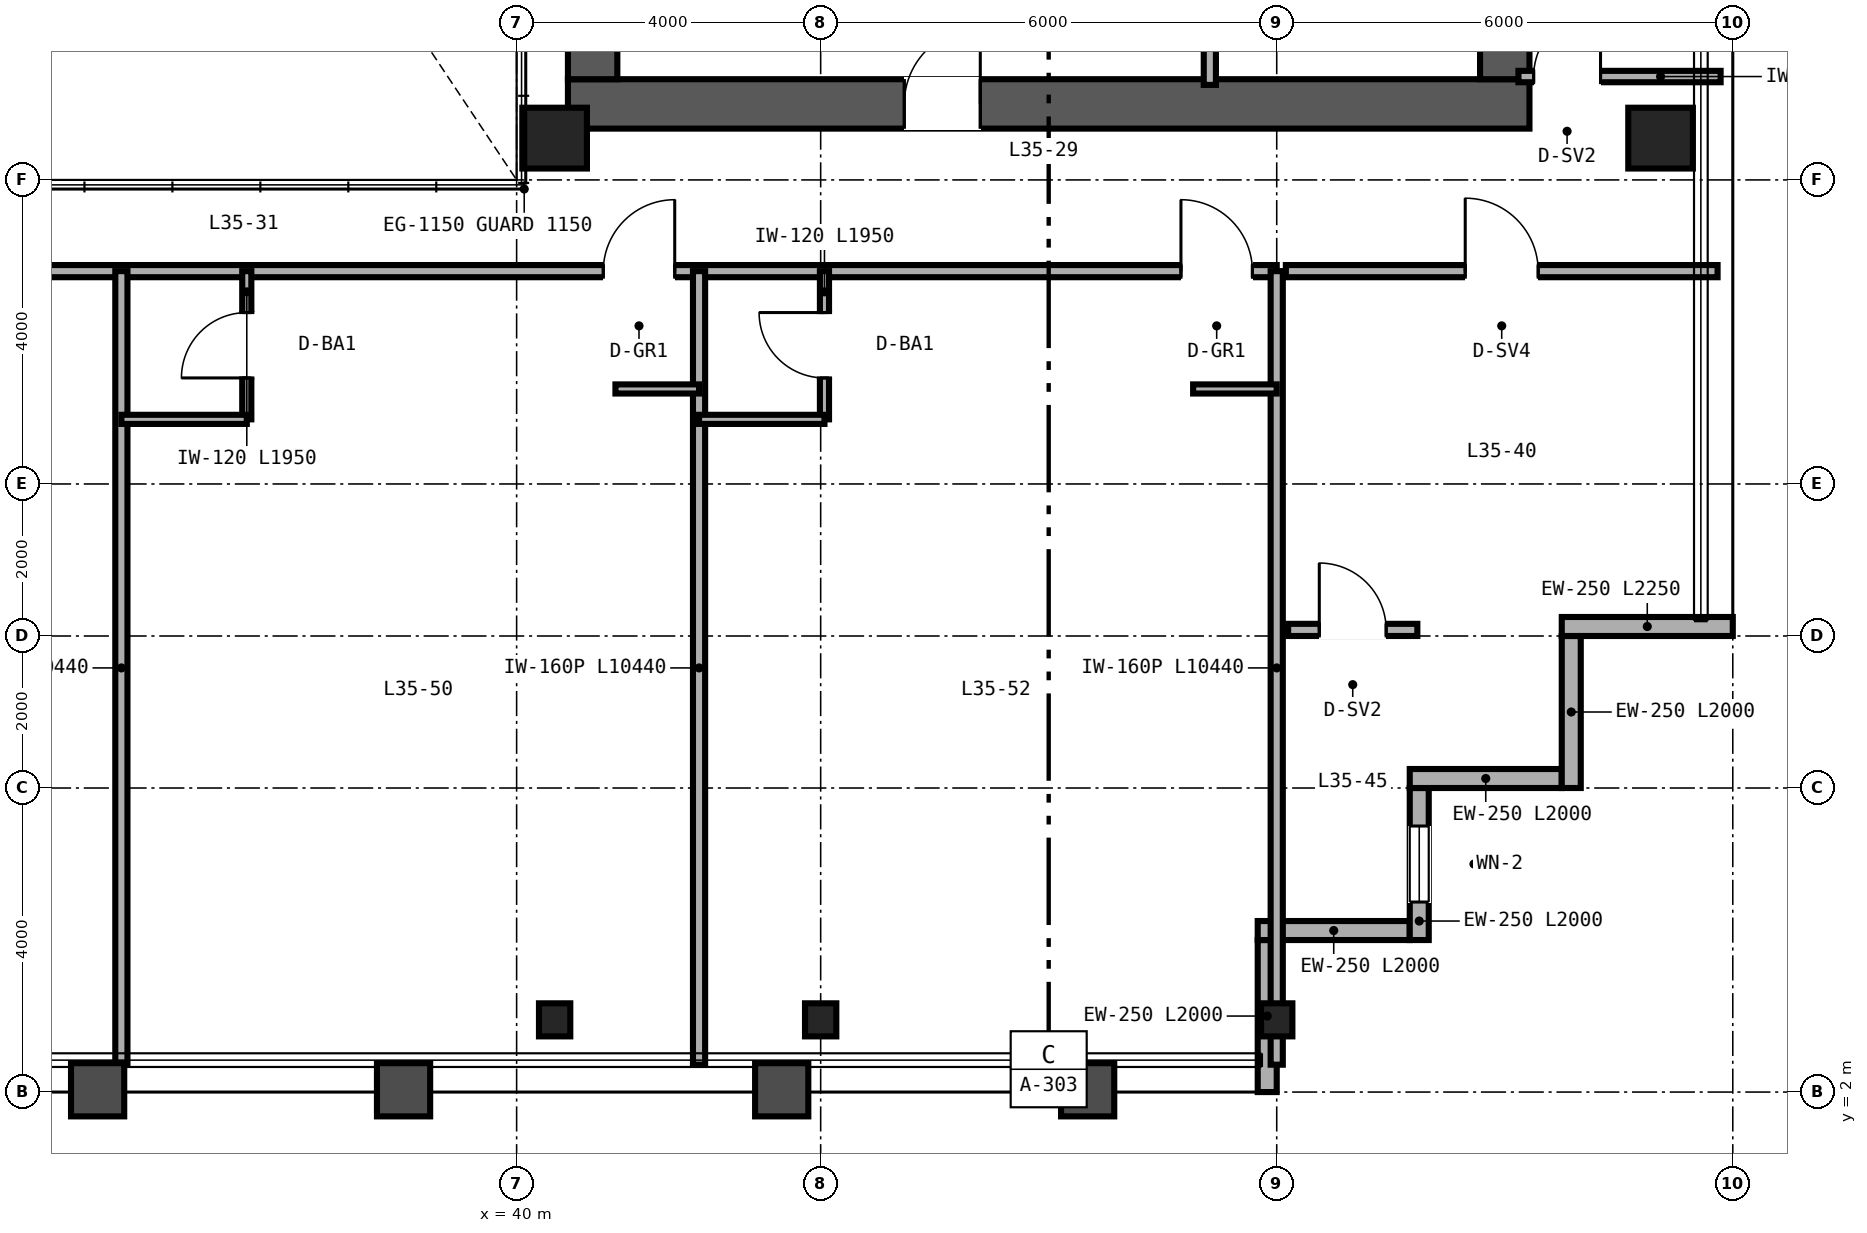
"""IFC4 building model, lengths in metres.
Left out: names, types, materials, properties, quantities, classifications, styles, units other than length and angle.
Written with IfcOpenShell. Run it as: python <this file> out.ifc"""

import sys

from ifc_helpers import new_model, si_unit, direction, frame, frame_2d, origin, origin_2d, place, context, subcontext, project, spatial, rectangle, hollow_rectangle, i_section, extrude, source, transform, mapped, element, fill, save


model = new_model("IFC4")
c1 = context("Model", 3, precision=1e-05, world=origin(), true_north=direction((0.0, 1.0)))
c2 = subcontext(c1, "Body", "Model", "MODEL_VIEW")
j1 = project(units=[si_unit("LENGTHUNIT", "METRE"), si_unit("PLANEANGLEUNIT", "RADIAN")], contexts=[c1])
p1 = place(None, origin())
s1 = spatial("IfcSite", under=j1, at=p1, CompositionType="ELEMENT")
p2 = place(p1, origin())
s2 = spatial("IfcBuilding", under=s1, at=p2, CompositionType="ELEMENT")
p3 = place(p2, frame((0.0, 0.0, 140.4)))
s3 = spatial("IfcBuildingStorey", under=s2, at=p3, CompositionType="ELEMENT", Elevation=140.4)
p4 = place(p3, frame((40.675, 15.0, 0.0), z_axis=(0.0, 0.0, 1.0), x_axis=(1.0, 0.0, 0.0)))
e1 = element("IfcWall", 1, at=p4, inside=s3, PredefinedType="SHEAR", context=c2, shape_type="SweptSolid", body=[
    extrude(rectangle(XDim=12.65, YDim=0.65, at=frame_2d((6.325, 0.0))), origin(), (0.0, 0.0, 1.0), 3.36),
])
p5 = place(p4, frame((4.425, 0.0, 0.0)))
e2 = element("IfcOpeningElement", 2, at=p5, cuts=e1, PredefinedType="OPENING", context=c2, shape_type="SweptSolid", body=[
    extrude(rectangle(XDim=1.0, YDim=2.15, at=frame_2d((0.5, 1.075))), frame((0.0, 0.335, 0.0), z_axis=(0.0, -1.0, 0.0), x_axis=(1.0, 0.0, 0.0)), (0.0, 0.0, 1.0), 0.67),
])
for number, where, z_axis, x_axis in (
    (3, (41.0, 15.325, 0.0), (0.0, 0.0, 1.0), (0.0, 1.0, 0.0)),
    (4, (53.0, 15.325, 0.0), (0.0, 0.0, 1.0), (0.0, 1.0, 0.0)),
):
    element("IfcWall", number, at=place(p3, frame(where, z_axis=z_axis, x_axis=x_axis)), inside=s3, PredefinedType="SHEAR", context=c2, shape_type="SweptSolid", body=[
        extrude(rectangle(XDim=21.35, YDim=0.65, at=frame_2d((10.675, 0.0))), origin(), (0.0, 0.0, 1.0), 3.36),
    ])
m1 = source(origin(), c2, "Body", "SweptSolid", [
    extrude(hollow_rectangle(XDim=0.85, YDim=0.8, WallThickness=0.032, at=origin_2d()), origin(), (0.0, 0.0, 1.0), 3.36),
])
for number, where, z_axis, x_axis in (
    (5, (40.5, 14.55, 0.0), (0.0, 0.0, 1.0), (1.0, 0.0, 0.0)),
    (6, (55.05, 14.55, 0.0), (0.0, 0.0, 1.0), (1.0, 0.0, 0.0)),
):
    element("IfcColumn", number, at=place(p3, frame(where, z_axis=z_axis, x_axis=x_axis)), inside=s3, PredefinedType="COLUMN", context=c2, shape_type="MappedRepresentation", body=[
        mapped(m1, transform((0.0, 0.0, 0.0), scale=1.0)),
    ])
m2 = source(origin(), c2, "Body", "SweptSolid", [
    extrude(i_section(OverallWidth=0.412, OverallDepth=0.435, WebThickness=0.036, FlangeThickness=0.057, FilletRadius=0.025, at=origin_2d()), origin(), (0.0, 0.0, 1.0), 3.36),
])
for number, where, z_axis, x_axis in (
    (7, (40.5, 2.95, 0.0), (0.0, 0.0, 1.0), (1.0, 0.0, 0.0)),
    (8, (44.0, 2.95, 0.0), (0.0, 0.0, 1.0), (1.0, 0.0, 0.0)),
    (9, (50.0, 2.95, 0.0), (0.0, 0.0, 1.0), (1.0, 0.0, 0.0)),
):
    element("IfcColumn", number, at=place(p3, frame(where, z_axis=z_axis, x_axis=x_axis)), inside=s3, PredefinedType="COLUMN", context=c2, shape_type="MappedRepresentation", body=[
        mapped(m2, transform((0.0, 0.0, 0.0), scale=1.0)),
    ])
p6 = place(p3, frame((49.875, 2.0, 0.0), z_axis=(0.0, 0.0, 1.0), x_axis=(0.0, 1.0, 0.0)))
e10 = element("IfcWall", 10, at=p6, inside=s3, PredefinedType="SOLIDWALL", context=c2, shape_type="SweptSolid", body=[
    extrude(rectangle(XDim=2.0, YDim=0.25, at=frame_2d((1.0, 0.0))), origin(), (0.0, 0.0, 1.0), 2.667),
])
p7 = place(p3, frame((49.75, 4.125, 0.0), z_axis=(0.0, 0.0, 1.0), x_axis=(1.0, 0.0, 0.0)))
e11 = element("IfcWall", 11, at=p7, inside=s3, PredefinedType="SOLIDWALL", context=c2, shape_type="SweptSolid", body=[
    extrude(rectangle(XDim=2.0, YDim=0.25, at=frame_2d((1.0, 0.0))), origin(), (0.0, 0.0, 1.0), 3.36),
])
p8 = place(p3, frame((51.875, 4.0, 0.0), z_axis=(0.0, 0.0, 1.0), x_axis=(0.0, 1.0, 0.0)))
e12 = element("IfcWall", 12, at=p8, inside=s3, PredefinedType="SOLIDWALL", context=c2, shape_type="SweptSolid", body=[
    extrude(rectangle(XDim=2.0, YDim=0.25, at=frame_2d((1.0, 0.0))), origin(), (0.0, 0.0, 1.0), 3.36),
])
p9 = place(p8, frame((0.5, 0.0, 0.85)))
e13 = element("IfcOpeningElement", 13, at=p9, cuts=e12, PredefinedType="OPENING", context=c2, shape_type="SweptSolid", body=[
    extrude(rectangle(XDim=1.0, YDim=1.9, at=frame_2d((0.5, 0.95))), frame((0.0, 0.135, 0.0), z_axis=(0.0, -1.0, 0.0), x_axis=(1.0, 0.0, 0.0)), (0.0, 0.0, 1.0), 0.27),
])
for number, where, z_axis, x_axis in (
    (14, (51.75, 6.125, 0.0), (0.0, 0.0, 1.0), (1.0, 0.0, 0.0)),
    (15, (53.875, 6.0, 0.0), (0.0, 0.0, 1.0), (0.0, 1.0, 0.0)),
):
    element("IfcWall", number, at=place(p3, frame(where, z_axis=z_axis, x_axis=x_axis)), inside=s3, PredefinedType="SOLIDWALL", context=c2, shape_type="SweptSolid", body=[
        extrude(rectangle(XDim=2.0, YDim=0.25, at=frame_2d((1.0, 0.0))), origin(), (0.0, 0.0, 1.0), 3.36),
    ])
p10 = place(p3, frame((53.75, 8.125, 0.0), z_axis=(0.0, 0.0, 1.0), x_axis=(1.0, 0.0, 0.0)))
e16 = element("IfcWall", 16, at=p10, inside=s3, PredefinedType="SOLIDWALL", context=c2, shape_type="SweptSolid", body=[
    extrude(rectangle(XDim=2.25, YDim=0.25, at=frame_2d((1.125, 0.0))), origin(), (0.0, 0.0, 1.0), 3.36),
])
p11 = place(p3, frame((49.12, 15.25, 0.0), z_axis=(0.0, 0.0, 1.0), x_axis=(0.0, 1.0, 0.0)))
e17 = element("IfcWall", 17, at=p11, inside=s3, PredefinedType="PARTITIONING", context=c2, shape_type="SweptSolid", body=[
    extrude(rectangle(XDim=16.13, YDim=0.16, at=frame_2d((8.065, 0.0))), origin(), (0.0, 0.0, 1.0), 2.36),
])
p12 = place(p11, frame((2.2, 0.0, 0.0)))
e18 = element("IfcOpeningElement", 18, at=p12, cuts=e17, PredefinedType="OPENING", context=c2, shape_type="SweptSolid", body=[
    extrude(rectangle(XDim=0.9, YDim=2.15, at=frame_2d((0.45, 1.075))), frame((0.0, 0.09, 0.0), z_axis=(0.0, -1.0, 0.0), x_axis=(1.0, 0.0, 0.0)), (0.0, 0.0, 1.0), 0.18),
])
p13 = place(p11, frame((8.2, 0.0, 0.0)))
e19 = element("IfcOpeningElement", 19, at=p13, cuts=e17, PredefinedType="OPENING", context=c2, shape_type="SweptSolid", body=[
    extrude(rectangle(XDim=0.9, YDim=2.15, at=frame_2d((0.45, 1.075))), frame((0.0, 0.09, 0.0), z_axis=(0.0, -1.0, 0.0), x_axis=(1.0, 0.0, 0.0)), (0.0, 0.0, 1.0), 0.18),
])
p14 = place(p11, frame((13.5, 0.0, 0.0)))
e20 = element("IfcOpeningElement", 20, at=p14, cuts=e17, PredefinedType="OPENING", context=c2, shape_type="SweptSolid", body=[
    extrude(rectangle(XDim=0.9, YDim=2.15, at=frame_2d((0.45, 1.075))), frame((0.0, 0.09, 0.0), z_axis=(0.0, -1.0, 0.0), x_axis=(1.0, 0.0, 0.0)), (0.0, 0.0, 1.0), 0.18),
])
p15 = place(p3, frame((53.18, 15.36, 0.0), z_axis=(0.0, 0.0, 1.0), x_axis=(1.0, 0.0, 0.0)))
e21 = element("IfcWall", 21, at=p15, inside=s3, PredefinedType="PARTITIONING", context=c2, shape_type="SweptSolid", body=[
    extrude(rectangle(XDim=2.66, YDim=0.15, at=frame_2d((1.33, 0.0))), origin(), (0.0, 0.0, 1.0), 2.581),
])
p16 = place(p15, frame((0.2, 0.0, 0.0)))
e22 = element("IfcOpeningElement", 22, at=p16, cuts=e21, PredefinedType="OPENING", context=c2, shape_type="SweptSolid", body=[
    extrude(rectangle(XDim=0.88, YDim=2.15, at=frame_2d((0.44, 1.075))), frame((0.0, 0.085, 0.0), z_axis=(0.0, -1.0, 0.0), x_axis=(1.0, 0.0, 0.0)), (0.0, 0.0, 1.0), 0.17),
])
p17 = place(p3, frame((50.12, 12.8, 0.0), z_axis=(0.0, 0.0, 1.0), x_axis=(1.0, 0.0, 0.0)))
e23 = element("IfcWall", 23, at=p17, inside=s3, PredefinedType="PARTITIONING", context=c2, shape_type="SweptSolid", body=[
    extrude(rectangle(XDim=5.68, YDim=0.16, at=frame_2d((2.84, 0.0))), origin(), (0.0, 0.0, 1.0), 3.36),
])
p18 = place(p17, frame((2.36, 0.0, 0.0)))
e24 = element("IfcOpeningElement", 24, at=p18, cuts=e23, PredefinedType="OPENING", context=c2, shape_type="SweptSolid", body=[
    extrude(rectangle(XDim=0.96, YDim=2.15, at=frame_2d((0.48, 1.075))), frame((0.0, 0.09, 0.0), z_axis=(0.0, -1.0, 0.0), x_axis=(1.0, 0.0, 0.0)), (0.0, 0.0, 1.0), 0.18),
])
p19 = place(p3, frame((50.15, 8.08, 0.0), z_axis=(0.0, 0.0, 1.0), x_axis=(1.0, 0.0, 0.0)))
e25 = element("IfcWall", 25, at=p19, inside=s3, PredefinedType="PARTITIONING", context=c2, shape_type="SweptSolid", body=[
    extrude(rectangle(XDim=1.7, YDim=0.16, at=frame_2d((0.85, 0.0))), origin(), (0.0, 0.0, 1.0), 3.36),
])
p20 = place(p19, frame((0.41, 0.0, 0.0)))
e26 = element("IfcOpeningElement", 26, at=p20, cuts=e25, PredefinedType="OPENING", context=c2, shape_type="SweptSolid", body=[
    extrude(rectangle(XDim=0.88, YDim=2.15, at=frame_2d((0.44, 1.075))), frame((0.0, 0.09, 0.0), z_axis=(0.0, -1.0, 0.0), x_axis=(1.0, 0.0, 0.0)), (0.0, 0.0, 1.0), 0.18),
])
p21 = place(p3, frame((14.0, 12.8, 0.0), z_axis=(0.0, 0.0, 1.0), x_axis=(1.0, 0.0, 0.0)))
e27 = element("IfcWall", 27, at=p21, inside=s3, PredefinedType="PARTITIONING", context=c2, shape_type="SweptSolid", body=[
    extrude(rectangle(XDim=36.0, YDim=0.16, at=frame_2d((18.0, 0.0))), origin(), (0.0, 0.0, 1.0), 2.581),
])
p22 = place(p21, frame((5.5, 0.0, 0.0)))
e28 = element("IfcOpeningElement", 28, at=p22, cuts=e27, PredefinedType="OPENING", context=c2, shape_type="SweptSolid", body=[
    extrude(rectangle(XDim=0.98, YDim=2.2, at=frame_2d((0.49, 1.1))), frame((0.0, 0.09, 0.0), z_axis=(0.0, -1.0, 0.0), x_axis=(1.0, 0.0, 0.0)), (0.0, 0.0, 1.0), 0.18),
])
p23 = place(p21, frame((10.2, 0.0, 0.0)))
e29 = element("IfcOpeningElement", 29, at=p23, cuts=e27, PredefinedType="OPENING", context=c2, shape_type="SweptSolid", body=[
    extrude(rectangle(XDim=0.96, YDim=2.15, at=frame_2d((0.48, 1.075))), frame((0.0, 0.09, 0.0), z_axis=(0.0, -1.0, 0.0), x_axis=(1.0, 0.0, 0.0)), (0.0, 0.0, 1.0), 0.18),
])
p24 = place(p21, frame((16.72, 0.0, 0.0)))
e30 = element("IfcOpeningElement", 30, at=p24, cuts=e27, PredefinedType="OPENING", context=c2, shape_type="SweptSolid", body=[
    extrude(rectangle(XDim=0.96, YDim=2.15, at=frame_2d((0.48, 1.075))), frame((0.0, 0.09, 0.0), z_axis=(0.0, -1.0, 0.0), x_axis=(1.0, 0.0, 0.0)), (0.0, 0.0, 1.0), 0.18),
])
p25 = place(p21, frame((27.14, 0.0, 0.0)))
e31 = element("IfcOpeningElement", 31, at=p25, cuts=e27, PredefinedType="OPENING", context=c2, shape_type="SweptSolid", body=[
    extrude(rectangle(XDim=0.94, YDim=2.15, at=frame_2d((0.47, 1.075))), frame((0.0, 0.09, 0.0), z_axis=(0.0, -1.0, 0.0), x_axis=(1.0, 0.0, 0.0)), (0.0, 0.0, 1.0), 0.18),
])
p26 = place(p21, frame((34.74, 0.0, 0.0)))
e32 = element("IfcOpeningElement", 32, at=p26, cuts=e27, PredefinedType="OPENING", context=c2, shape_type="SweptSolid", body=[
    extrude(rectangle(XDim=0.94, YDim=2.15, at=frame_2d((0.47, 1.075))), frame((0.0, 0.09, 0.0), z_axis=(0.0, -1.0, 0.0), x_axis=(1.0, 0.0, 0.0)), (0.0, 0.0, 1.0), 0.18),
])
p27 = place(p3, frame((50.0, 2.36, 0.0), z_axis=(0.0, 0.0, 1.0), x_axis=(0.0, 1.0, 0.0)))
e33 = element("IfcWall", 33, at=p27, inside=s3, PredefinedType="PARTITIONING", context=c2, shape_type="SweptSolid", body=[
    extrude(rectangle(XDim=10.44, YDim=0.16, at=frame_2d((5.22, 0.0))), origin(), (0.0, 0.0, 1.0), 2.667),
])
p28 = place(p3, frame((34.8, 2.36, 0.0), z_axis=(0.0, 0.0, 1.0), x_axis=(0.0, 1.0, 0.0)))
e34 = element("IfcWall", 34, at=p28, inside=s3, PredefinedType="PARTITIONING", context=c2, shape_type="SweptSolid", body=[
    extrude(rectangle(XDim=10.44, YDim=0.16, at=frame_2d((5.22, 0.0))), origin(), (0.0, 0.0, 1.0), 2.433),
])
p29 = place(p3, frame((42.4, 2.36, 0.0), z_axis=(0.0, 0.0, 1.0), x_axis=(0.0, 1.0, 0.0)))
e35 = element("IfcWall", 35, at=p29, inside=s3, PredefinedType="PARTITIONING", context=c2, shape_type="SweptSolid", body=[
    extrude(rectangle(XDim=10.44, YDim=0.16, at=frame_2d((5.22, 0.0))), origin(), (0.0, 0.0, 1.0), 2.823),
])
p30 = place(p3, frame((36.45, 10.85, 0.0), z_axis=(0.0, 0.0, 1.0), x_axis=(0.0, 1.0, 0.0)))
e36 = element("IfcWall", 36, at=p30, inside=s3, PredefinedType="PARTITIONING", context=c2, shape_type="SweptSolid", body=[
    extrude(rectangle(XDim=1.95, YDim=0.12, at=frame_2d((0.975, 0.0))), origin(), (0.0, 0.0, 1.0), 3.36),
])
p31 = place(p30, frame((0.545, 0.0, 0.0)))
e37 = element("IfcOpeningElement", 37, at=p31, cuts=e36, PredefinedType="OPENING", context=c2, shape_type="SweptSolid", body=[
    extrude(rectangle(XDim=0.86, YDim=2.1, at=frame_2d((0.43, 1.05))), frame((0.0, 0.07, 0.0), z_axis=(0.0, -1.0, 0.0), x_axis=(1.0, 0.0, 0.0)), (0.0, 0.0, 1.0), 0.14),
])
p32 = place(p3, frame((34.8, 10.85, 0.0), z_axis=(0.0, 0.0, 1.0), x_axis=(1.0, 0.0, 0.0)))
e38 = element("IfcWall", 38, at=p32, inside=s3, PredefinedType="PARTITIONING", context=c2, shape_type="SweptSolid", body=[
    extrude(rectangle(XDim=1.65, YDim=0.12, at=frame_2d((0.825, 0.0))), origin(), (0.0, 0.0, 1.0), 3.36),
])
p33 = place(p3, frame((41.3, 11.25, 0.0), z_axis=(0.0, 0.0, 1.0), x_axis=(1.0, 0.0, 0.0)))
e39 = element("IfcWall", 39, at=p33, inside=s3, PredefinedType="PARTITIONING", context=c2, shape_type="SweptSolid", body=[
    extrude(rectangle(XDim=1.1, YDim=0.12, at=frame_2d((0.55, 0.0))), origin(), (0.0, 0.0, 1.0), 3.36),
])
p34 = place(p3, frame((44.05, 10.85, 0.0), z_axis=(0.0, 0.0, 1.0), x_axis=(0.0, 1.0, 0.0)))
e40 = element("IfcWall", 40, at=p34, inside=s3, PredefinedType="PARTITIONING", context=c2, shape_type="SweptSolid", body=[
    extrude(rectangle(XDim=1.95, YDim=0.12, at=frame_2d((0.975, 0.0))), origin(), (0.0, 0.0, 1.0), 3.36),
])
p35 = place(p34, frame((0.545, 0.0, 0.0)))
e41 = element("IfcOpeningElement", 41, at=p35, cuts=e40, PredefinedType="OPENING", context=c2, shape_type="SweptSolid", body=[
    extrude(rectangle(XDim=0.86, YDim=2.1, at=frame_2d((0.43, 1.05))), frame((0.0, 0.07, 0.0), z_axis=(0.0, -1.0, 0.0), x_axis=(1.0, 0.0, 0.0)), (0.0, 0.0, 1.0), 0.14),
])
p36 = place(p3, frame((42.4, 10.85, 0.0), z_axis=(0.0, 0.0, 1.0), x_axis=(1.0, 0.0, 0.0)))
e42 = element("IfcWall", 42, at=p36, inside=s3, PredefinedType="PARTITIONING", context=c2, shape_type="SweptSolid", body=[
    extrude(rectangle(XDim=1.65, YDim=0.12, at=frame_2d((0.825, 0.0))), origin(), (0.0, 0.0, 1.0), 3.36),
])
p37 = place(p3, frame((48.9, 11.25, 0.0), z_axis=(0.0, 0.0, 1.0), x_axis=(1.0, 0.0, 0.0)))
e43 = element("IfcWall", 43, at=p37, inside=s3, PredefinedType="PARTITIONING", context=c2, shape_type="SweptSolid", body=[
    extrude(rectangle(XDim=1.1, YDim=0.12, at=frame_2d((0.55, 0.0))), origin(), (0.0, 0.0, 1.0), 3.36),
])
m3 = source(origin(), c2, "Body", "SweptSolid", [
    extrude(rectangle(XDim=1.0, YDim=1.9, at=frame_2d((0.5, 0.95))), frame((0.0, 0.03, 0.0), z_axis=(0.0, -1.0, 0.0), x_axis=(1.0, 0.0, 0.0)), (0.0, 0.0, 1.0), 0.06),
])
p38 = place(p9, origin())
e44 = element("IfcWindow", 44, at=p38, inside=s3, PartitioningType="SINGLE_PANEL", PredefinedType="WINDOW", context=c2, shape_type="MappedRepresentation", body=[
    mapped(m3, transform((0.0, 0.0, 0.0), scale=1.0)),
])
fill(e13, e44)
m4 = source(origin(), c2, "Body", "SweptSolid", [
    extrude(rectangle(XDim=1.0, YDim=2.15, at=frame_2d((0.5, 1.075))), frame((0.0, 0.025, 0.0), z_axis=(0.0, -1.0, 0.0), x_axis=(1.0, 0.0, 0.0)), (0.0, 0.0, 1.0), 0.05),
])
p39 = place(p5, origin())
e45 = element("IfcDoor", 45, at=p39, inside=s3, OperationType="SINGLE_SWING_RIGHT", PredefinedType="DOOR", context=c2, shape_type="MappedRepresentation", body=[
    mapped(m4, transform((0.0, 0.0, 0.0), scale=1.0)),
])
fill(e2, e45)
m5 = source(origin(), c2, "Body", "SweptSolid", [
    extrude(rectangle(XDim=0.88, YDim=2.15, at=frame_2d((0.44, 1.075))), frame((0.0, 0.025, 0.0), z_axis=(0.0, -1.0, 0.0), x_axis=(1.0, 0.0, 0.0)), (0.0, 0.0, 1.0), 0.05),
])
p40 = place(p16, origin())
e46 = element("IfcDoor", 46, at=p40, inside=s3, OperationType="SINGLE_SWING_RIGHT", PredefinedType="DOOR", context=c2, shape_type="MappedRepresentation", body=[
    mapped(m5, transform((0.0, 0.0, 0.0), scale=1.0)),
])
fill(e22, e46)
m6 = source(origin(), c2, "Body", "SweptSolid", [
    extrude(rectangle(XDim=0.96, YDim=2.15, at=frame_2d((0.48, 1.075))), frame((0.0, 0.025, 0.0), z_axis=(0.0, -1.0, 0.0), x_axis=(1.0, 0.0, 0.0)), (0.0, 0.0, 1.0), 0.05),
])
p41 = place(p18, origin())
e47 = element("IfcDoor", 47, at=p41, inside=s3, OperationType="SINGLE_SWING_LEFT", PredefinedType="DOOR", context=c2, shape_type="MappedRepresentation", body=[
    mapped(m6, transform((0.0, 0.0, 0.0), scale=1.0)),
])
fill(e24, e47)
p42 = place(p20, origin())
e48 = element("IfcDoor", 48, at=p42, inside=s3, OperationType="SINGLE_SWING_LEFT", PredefinedType="DOOR", context=c2, shape_type="MappedRepresentation", body=[
    mapped(m5, transform((0.0, 0.0, 0.0), scale=1.0)),
])
fill(e26, e48)
m7 = source(origin(), c2, "Body", "SweptSolid", [
    extrude(rectangle(XDim=0.86, YDim=2.1, at=frame_2d((0.43, 1.05))), frame((0.0, 0.025, 0.0), z_axis=(0.0, -1.0, 0.0), x_axis=(1.0, 0.0, 0.0)), (0.0, 0.0, 1.0), 0.05),
])
p43 = place(p31, origin())
e49 = element("IfcDoor", 49, at=p43, inside=s3, OperationType="SINGLE_SWING_LEFT", PredefinedType="DOOR", context=c2, shape_type="MappedRepresentation", body=[
    mapped(m7, transform((0.0, 0.0, 0.0), scale=1.0)),
])
fill(e37, e49)
p44 = place(p35, origin())
e50 = element("IfcDoor", 50, at=p44, inside=s3, OperationType="SINGLE_SWING_RIGHT", PredefinedType="DOOR", context=c2, shape_type="MappedRepresentation", body=[
    mapped(m7, transform((0.0, 0.0, 0.0), scale=1.0)),
])
fill(e41, e50)
m8 = source(origin(), c2, "Body", "SweptSolid", [
    extrude(rectangle(XDim=0.94, YDim=2.15, at=frame_2d((0.47, 1.075))), frame((0.0, 0.025, 0.0), z_axis=(0.0, -1.0, 0.0), x_axis=(1.0, 0.0, 0.0)), (0.0, 0.0, 1.0), 0.05),
])
p45 = place(p25, origin())
e51 = element("IfcDoor", 51, at=p45, inside=s3, OperationType="SINGLE_SWING_RIGHT", PredefinedType="DOOR", context=c2, shape_type="MappedRepresentation", body=[
    mapped(m8, transform((0.0, 0.0, 0.0), scale=1.0)),
])
fill(e31, e51)
p46 = place(p26, origin())
e52 = element("IfcDoor", 52, at=p46, inside=s3, OperationType="SINGLE_SWING_LEFT", PredefinedType="DOOR", context=c2, shape_type="MappedRepresentation", body=[
    mapped(m8, transform((0.0, 0.0, 0.0), scale=1.0)),
])
fill(e32, e52)
save(model, sys.argv[1])
